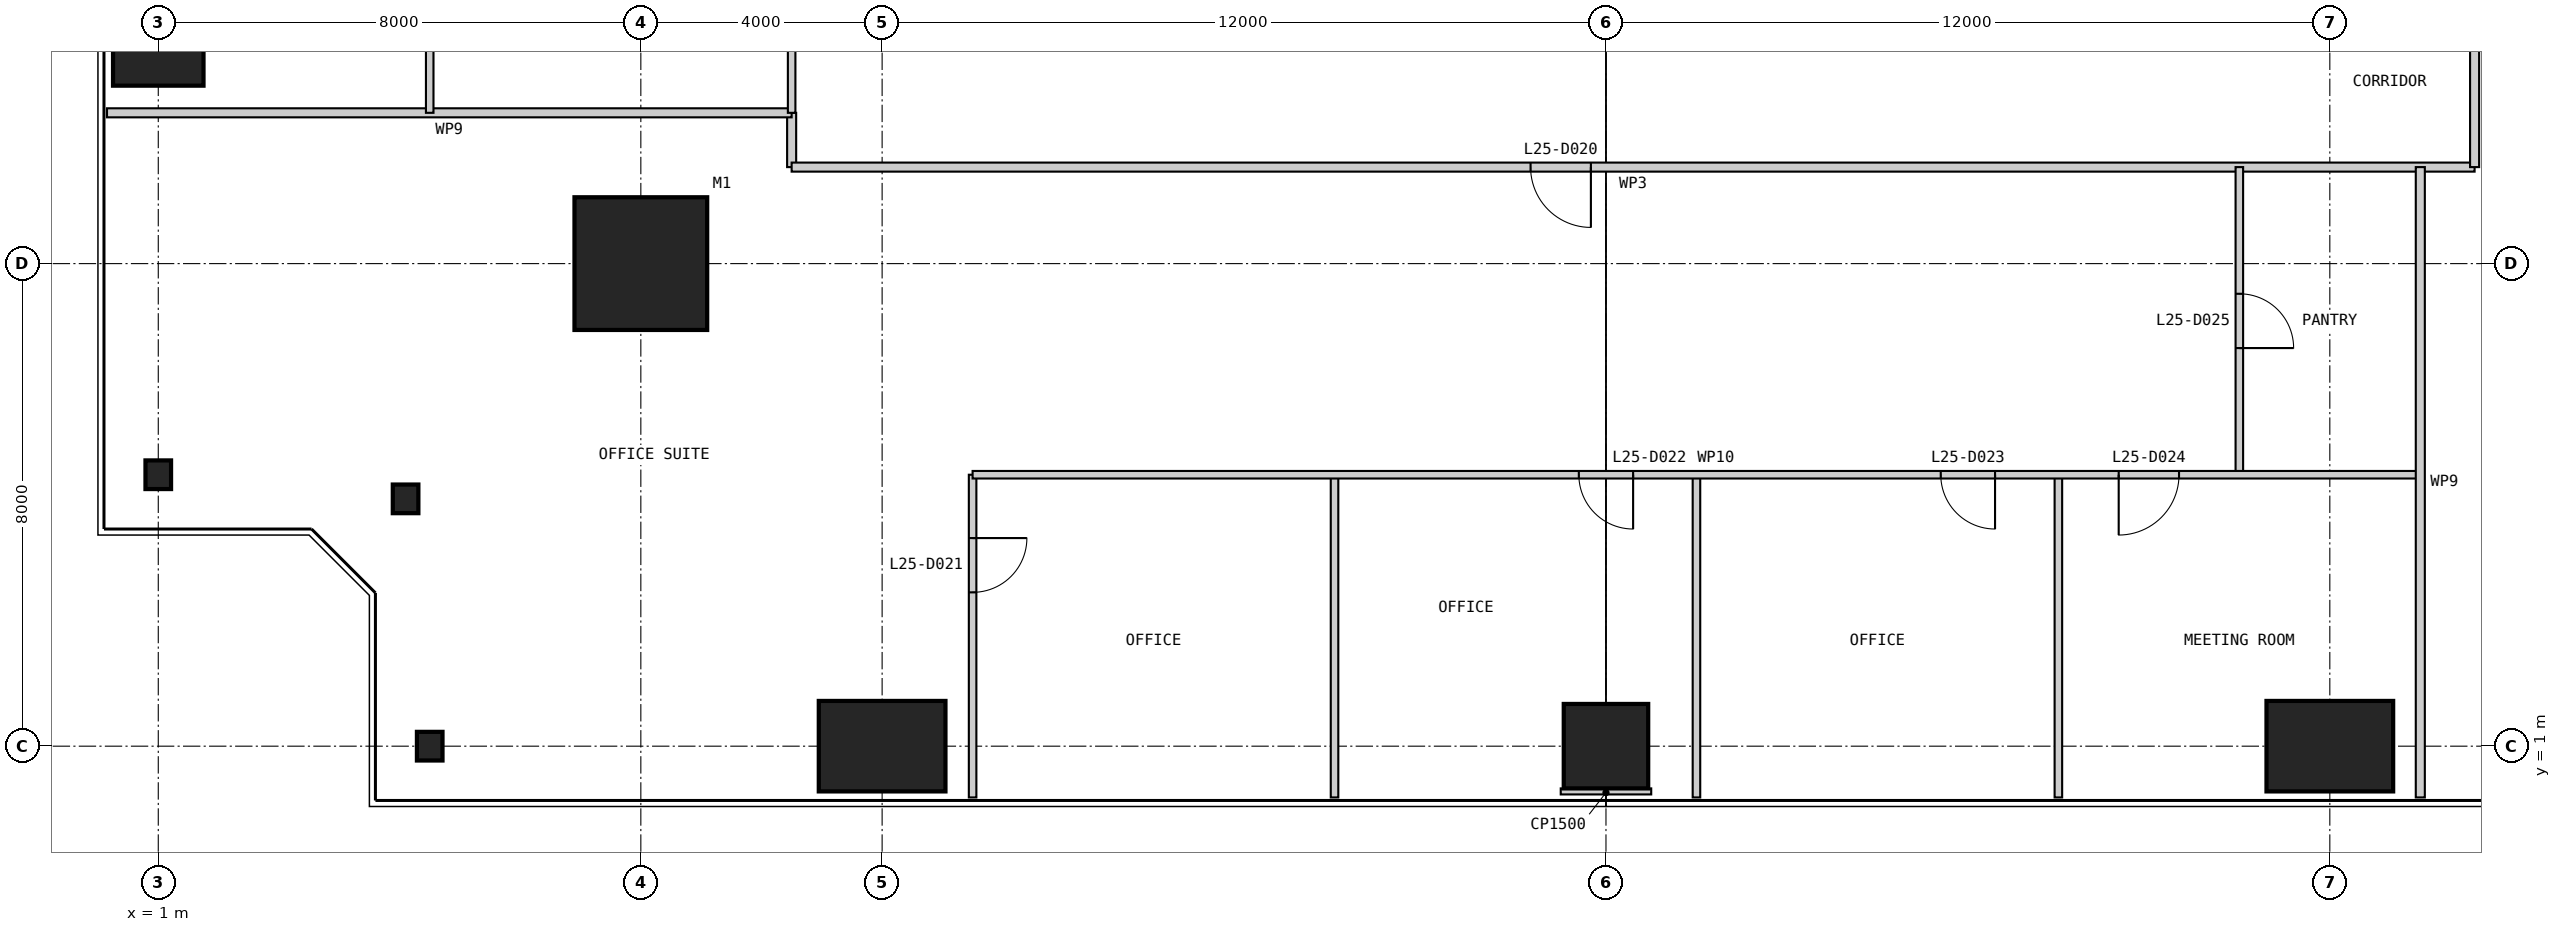
"""IFC4 building model, lengths in metres.
Left out: names, types, materials, properties, quantities, classifications, styles, units other than length and angle.
Written with IfcOpenShell. Run it as: python <this file> out.ifc"""

import sys

from ifc_helpers import new_model, si_unit, direction, frame, frame_2d, origin, origin_2d, place, context, subcontext, project, spatial, rectangle, i_section, extrude, element, fill, save


model = new_model("IFC4")
c1 = context("Model", 3, precision=1e-05, world=origin(), true_north=direction((0.0, 1.0)))
c2 = subcontext(c1, "Body", "Model", "MODEL_VIEW")
j1 = project(units=[si_unit("LENGTHUNIT", "METRE"), si_unit("PLANEANGLEUNIT", "RADIAN")], contexts=[c1])
p1 = place(None, origin())
s1 = spatial("IfcSite", under=j1, at=p1, CompositionType="ELEMENT")
p2 = place(p1, origin())
s2 = spatial("IfcBuilding", under=s1, at=p2, CompositionType="ELEMENT")
p3 = place(p2, frame((0.0, 0.0, 110.4)))
s3 = spatial("IfcBuildingStorey", under=s2, at=p3, CompositionType="ELEMENT", Elevation=110.4)
p4 = place(p3, frame((9.0, 9.0, 0.0), z_axis=(0.0, 0.0, 1.0), x_axis=(1.0, 0.0, 0.0)))
e1 = element("IfcColumn", 1, at=p4, inside=s3, PredefinedType="COLUMN", context=c2, shape_type="SweptSolid", body=[
    extrude(rectangle(XDim=2.2, YDim=2.2, at=origin_2d()), origin(), (0.0, 0.0, 1.0), 4.0),
])
p5 = place(p3, frame((5.5, 1.0, 0.0), z_axis=(0.0, 0.0, 1.0), x_axis=(1.0, 0.0, 0.0)))
e2 = element("IfcColumn", 2, at=p5, inside=s3, PredefinedType="COLUMN", context=c2, shape_type="SweptSolid", body=[
    extrude(i_section(OverallWidth=0.424, OverallDepth=0.475, WebThickness=0.048, FlangeThickness=0.077, at=origin_2d()), origin(), (0.0, 0.0, 1.0), 4.0),
])
p6 = place(p3, frame((13.0, 1.0, 0.0), z_axis=(0.0, 0.0, 1.0), x_axis=(1.0, 0.0, 0.0)))
e3 = element("IfcColumn", 3, at=p6, inside=s3, PredefinedType="COLUMN", context=c2, shape_type="SweptSolid", body=[
    extrude(rectangle(XDim=2.1, YDim=1.5, at=origin_2d()), origin(), (0.0, 0.0, 1.0), 4.0),
])
p7 = place(p3, frame((25.0, 1.0, 0.0), z_axis=(0.0, 0.0, 1.0), x_axis=(1.0, 0.0, 0.0)))
e4 = element("IfcColumn", 4, at=p7, inside=s3, PredefinedType="COLUMN", context=c2, shape_type="SweptSolid", body=[
    extrude(rectangle(XDim=1.4, YDim=1.4, at=origin_2d()), origin(), (0.0, 0.0, 1.0), 4.0),
])
p8 = place(p3, frame((37.0, 1.0, 0.0), z_axis=(0.0, 0.0, 1.0), x_axis=(1.0, 0.0, 0.0)))
e5 = element("IfcColumn", 5, at=p8, inside=s3, PredefinedType="COLUMN", context=c2, shape_type="SweptSolid", body=[
    extrude(rectangle(XDim=2.1, YDim=1.5, at=origin_2d()), origin(), (0.0, 0.0, 1.0), 4.0),
])
p9 = place(p3, frame((1.0, 13.0, 0.0), z_axis=(0.0, 0.0, 1.0), x_axis=(1.0, 0.0, 0.0)))
e6 = element("IfcColumn", 6, at=p9, inside=s3, PredefinedType="COLUMN", context=c2, shape_type="SweptSolid", body=[
    extrude(rectangle(XDim=1.5, YDim=2.1, at=origin_2d()), origin(), (0.0, 0.0, 1.0), 4.0),
])
for number, where, z_axis, x_axis in (
    (7, (1.0, 5.5, 0.0), (0.0, 0.0, 1.0), (1.0, 0.0, 0.0)),
    (8, (5.1, 5.1, 0.0), (0.0, 0.0, 1.0), (1.0, 0.0, 0.0)),
):
    element("IfcColumn", number, at=place(p3, frame(where, z_axis=z_axis, x_axis=x_axis)), inside=s3, PredefinedType="COLUMN", context=c2, shape_type="SweptSolid", body=[
        extrude(i_section(OverallWidth=0.424, OverallDepth=0.475, WebThickness=0.048, FlangeThickness=0.077, at=origin_2d()), origin(), (0.0, 0.0, 1.0), 4.0),
    ])
p10 = place(p3, frame((11.5, 11.5, 0.0), z_axis=(0.0, 0.0, 1.0), x_axis=(0.0, -1.0, 0.0)))
e9 = element("IfcWall", 9, at=p10, inside=s3, PredefinedType="PARTITIONING", context=c2, shape_type="SweptSolid", body=[
    extrude(rectangle(XDim=0.9, YDim=0.15, at=frame_2d((0.45, 0.0))), origin(), (0.0, 0.0, 1.0), 3.85),
])
p11 = place(p3, frame((11.5, 10.6, 0.0), z_axis=(0.0, 0.0, 1.0), x_axis=(1.0, 0.0, 0.0)))
e10 = element("IfcWall", 10, at=p11, inside=s3, PredefinedType="PARTITIONING", context=c2, shape_type="SweptSolid", body=[
    extrude(rectangle(XDim=27.9, YDim=0.15, at=frame_2d((13.95, 0.0))), origin(), (0.0, 0.0, 1.0), 3.85),
])
p12 = place(p11, frame((12.25, 0.0, 0.0)))
e11 = element("IfcOpeningElement", 11, at=p12, cuts=e10, PredefinedType="OPENING", context=c2, shape_type="SweptSolid", body=[
    extrude(rectangle(XDim=1.0, YDim=2.2, at=frame_2d((0.5, 1.1))), frame((0.0, 0.085, 0.0), z_axis=(0.0, -1.0, 0.0), x_axis=(1.0, 0.0, 0.0)), (0.0, 0.0, 1.0), 0.17),
])
p13 = place(p3, frame((0.15, 11.5, 0.0), z_axis=(0.0, 0.0, 1.0), x_axis=(1.0, 0.0, 0.0)))
e12 = element("IfcWall", 12, at=p13, inside=s3, PredefinedType="PARTITIONING", context=c2, shape_type="SweptSolid", body=[
    extrude(rectangle(XDim=11.35, YDim=0.15, at=frame_2d((5.675, 0.0))), origin(), (0.0, 0.0, 1.0), 3.85),
])
p14 = place(p3, frame((14.5, 0.15, 0.0), z_axis=(0.0, 0.0, 1.0), x_axis=(0.0, 1.0, 0.0)))
e13 = element("IfcWall", 13, at=p14, inside=s3, PredefinedType="PARTITIONING", context=c2, shape_type="SweptSolid", body=[
    extrude(rectangle(XDim=5.35, YDim=0.125, at=frame_2d((2.675, 0.0))), origin(), (0.0, 0.0, 1.0), 3.85),
])
p15 = place(p14, frame((3.4, 0.0, 0.0)))
e14 = element("IfcOpeningElement", 14, at=p15, cuts=e13, PredefinedType="OPENING", context=c2, shape_type="SweptSolid", body=[
    extrude(rectangle(XDim=0.9, YDim=2.2, at=frame_2d((0.45, 1.1))), frame((0.0, 0.073, 0.0), z_axis=(0.0, -1.0, 0.0), x_axis=(1.0, 0.0, 0.0)), (0.0, 0.0, 1.0), 0.145),
])
for number, where, z_axis, x_axis in (
    (15, (20.5, 0.15, 0.0), (0.0, 0.0, 1.0), (0.0, 1.0, 0.0)),
    (16, (26.5, 0.15, 0.0), (0.0, 0.0, 1.0), (0.0, 1.0, 0.0)),
    (17, (32.5, 0.15, 0.0), (0.0, 0.0, 1.0), (0.0, 1.0, 0.0)),
):
    element("IfcWall", number, at=place(p3, frame(where, z_axis=z_axis, x_axis=x_axis)), inside=s3, PredefinedType="PARTITIONING", context=c2, shape_type="SweptSolid", body=[
        extrude(rectangle(XDim=5.35, YDim=0.125, at=frame_2d((2.675, 0.0))), origin(), (0.0, 0.0, 1.0), 3.85),
    ])
p16 = place(p3, frame((35.5, 5.5, 0.0), z_axis=(0.0, 0.0, 1.0), x_axis=(0.0, 1.0, 0.0)))
e18 = element("IfcWall", 18, at=p16, inside=s3, PredefinedType="PARTITIONING", context=c2, shape_type="SweptSolid", body=[
    extrude(rectangle(XDim=5.1, YDim=0.125, at=frame_2d((2.55, 0.0))), origin(), (0.0, 0.0, 1.0), 3.85),
])
p17 = place(p16, frame((2.1, 0.0, 0.0)))
e19 = element("IfcOpeningElement", 19, at=p17, cuts=e18, PredefinedType="OPENING", context=c2, shape_type="SweptSolid", body=[
    extrude(rectangle(XDim=0.9, YDim=2.2, at=frame_2d((0.45, 1.1))), frame((0.0, 0.073, 0.0), z_axis=(0.0, -1.0, 0.0), x_axis=(1.0, 0.0, 0.0)), (0.0, 0.0, 1.0), 0.145),
])
p18 = place(p3, frame((14.5, 5.5, 0.0), z_axis=(0.0, 0.0, 1.0), x_axis=(1.0, 0.0, 0.0)))
e20 = element("IfcWall", 20, at=p18, inside=s3, PredefinedType="PARTITIONING", context=c2, shape_type="SweptSolid", body=[
    extrude(rectangle(XDim=24.0, YDim=0.125, at=frame_2d((12.0, 0.0))), origin(), (0.0, 0.0, 1.0), 3.85),
])
p19 = place(p18, frame((10.05, 0.0, 0.0)))
e21 = element("IfcOpeningElement", 21, at=p19, cuts=e20, PredefinedType="OPENING", context=c2, shape_type="SweptSolid", body=[
    extrude(rectangle(XDim=0.9, YDim=2.2, at=frame_2d((0.45, 1.1))), frame((0.0, 0.073, 0.0), z_axis=(0.0, -1.0, 0.0), x_axis=(1.0, 0.0, 0.0)), (0.0, 0.0, 1.0), 0.145),
])
p20 = place(p18, frame((16.05, 0.0, 0.0)))
e22 = element("IfcOpeningElement", 22, at=p20, cuts=e20, PredefinedType="OPENING", context=c2, shape_type="SweptSolid", body=[
    extrude(rectangle(XDim=0.9, YDim=2.2, at=frame_2d((0.45, 1.1))), frame((0.0, 0.073, 0.0), z_axis=(0.0, -1.0, 0.0), x_axis=(1.0, 0.0, 0.0)), (0.0, 0.0, 1.0), 0.145),
])
p21 = place(p18, frame((19.0, 0.0, 0.0)))
e23 = element("IfcOpeningElement", 23, at=p21, cuts=e20, PredefinedType="OPENING", context=c2, shape_type="SweptSolid", body=[
    extrude(rectangle(XDim=1.0, YDim=2.2, at=frame_2d((0.5, 1.1))), frame((0.0, 0.073, 0.0), z_axis=(0.0, -1.0, 0.0), x_axis=(1.0, 0.0, 0.0)), (0.0, 0.0, 1.0), 0.145),
])
p22 = place(p3, frame((39.4, 10.6, 0.0), z_axis=(0.0, 0.0, 1.0), x_axis=(0.0, 1.0, 0.0)))
e24 = element("IfcWall", 24, at=p22, inside=s3, PredefinedType="PARTITIONING", context=c2, shape_type="SweptSolid", body=[
    extrude(rectangle(XDim=28.8, YDim=0.15, at=frame_2d((14.4, 0.0))), origin(), (0.0, 0.0, 1.0), 3.85),
])
p23 = place(p22, frame((12.4, 0.0, 0.0)))
e25 = element("IfcOpeningElement", 25, at=p23, cuts=e24, PredefinedType="OPENING", context=c2, shape_type="SweptSolid", body=[
    extrude(rectangle(XDim=1.0, YDim=2.2, at=frame_2d((0.5, 1.1))), frame((0.0, 0.085, 0.0), z_axis=(0.0, -1.0, 0.0), x_axis=(1.0, 0.0, 0.0)), (0.0, 0.0, 1.0), 0.17),
])
p24 = place(p3, frame((38.5, 0.15, 0.0), z_axis=(0.0, 0.0, 1.0), x_axis=(0.0, 1.0, 0.0)))
e26 = element("IfcWall", 26, at=p24, inside=s3, PredefinedType="PARTITIONING", context=c2, shape_type="SweptSolid", body=[
    extrude(rectangle(XDim=10.45, YDim=0.15, at=frame_2d((5.225, 0.0))), origin(), (0.0, 0.0, 1.0), 3.85),
])
p25 = place(p3, frame((5.5, 17.5, 0.0), z_axis=(0.0, 0.0, 1.0), x_axis=(0.0, -1.0, 0.0)))
e27 = element("IfcWall", 27, at=p25, inside=s3, PredefinedType="PARTITIONING", context=c2, shape_type="SweptSolid", body=[
    extrude(rectangle(XDim=6.0, YDim=0.125, at=frame_2d((3.0, 0.0))), origin(), (0.0, 0.0, 1.0), 3.85),
])
p26 = place(p3, frame((11.5, 14.5, 0.0), z_axis=(0.0, 0.0, 1.0), x_axis=(0.0, -1.0, 0.0)))
e28 = element("IfcWall", 28, at=p26, inside=s3, PredefinedType="PARTITIONING", context=c2, shape_type="SweptSolid", body=[
    extrude(rectangle(XDim=3.0, YDim=0.125, at=frame_2d((1.5, 0.0))), origin(), (0.0, 0.0, 1.0), 3.85),
])
p27 = place(p3, frame((25.0, 0.2, 0.0), z_axis=(0.0, 0.0, 1.0), x_axis=(0.0, 1.0, 0.0)))
e29 = element("IfcWall", 29, at=p27, inside=s3, PredefinedType="PARTITIONING", context=c2, shape_type="SweptSolid", body=[
    extrude(rectangle(XDim=0.1, YDim=1.5, at=frame_2d((0.05, 0.0))), origin(), (0.0, 0.0, 1.0), 3.85),
])
p28 = place(p12, frame((1.0, 0.0, 0.0), z_axis=(0.0, 0.0, 1.0), x_axis=(-1.0, 0.0, 0.0)))
e30 = element("IfcDoor", 30, at=p28, inside=s3, OperationType="SINGLE_SWING_LEFT", PredefinedType="DOOR", context=c2, shape_type="SweptSolid", body=[
    extrude(rectangle(XDim=1.0, YDim=2.2, at=frame_2d((0.5, 1.1))), frame((0.0, 0.025, 0.0), z_axis=(0.0, -1.0, 0.0), x_axis=(1.0, 0.0, 0.0)), (0.0, 0.0, 1.0), 0.05),
])
fill(e11, e30)
p29 = place(p15, frame((0.9, 0.0, 0.0), z_axis=(0.0, 0.0, 1.0), x_axis=(-1.0, 0.0, 0.0)))
e31 = element("IfcDoor", 31, at=p29, inside=s3, OperationType="SINGLE_SWING_LEFT", PredefinedType="DOOR", context=c2, shape_type="SweptSolid", body=[
    extrude(rectangle(XDim=0.9, YDim=2.2, at=frame_2d((0.45, 1.1))), frame((0.0, 0.025, 0.0), z_axis=(0.0, -1.0, 0.0), x_axis=(1.0, 0.0, 0.0)), (0.0, 0.0, 1.0), 0.05),
])
fill(e14, e31)
p30 = place(p19, frame((0.9, 0.0, 0.0), z_axis=(0.0, 0.0, 1.0), x_axis=(-1.0, 0.0, 0.0)))
e32 = element("IfcDoor", 32, at=p30, inside=s3, OperationType="SINGLE_SWING_LEFT", PredefinedType="DOOR", context=c2, shape_type="SweptSolid", body=[
    extrude(rectangle(XDim=0.9, YDim=2.2, at=frame_2d((0.45, 1.1))), frame((0.0, 0.025, 0.0), z_axis=(0.0, -1.0, 0.0), x_axis=(1.0, 0.0, 0.0)), (0.0, 0.0, 1.0), 0.05),
])
fill(e21, e32)
p31 = place(p20, frame((0.9, 0.0, 0.0), z_axis=(0.0, 0.0, 1.0), x_axis=(-1.0, 0.0, 0.0)))
e33 = element("IfcDoor", 33, at=p31, inside=s3, OperationType="SINGLE_SWING_LEFT", PredefinedType="DOOR", context=c2, shape_type="SweptSolid", body=[
    extrude(rectangle(XDim=0.9, YDim=2.2, at=frame_2d((0.45, 1.1))), frame((0.0, 0.025, 0.0), z_axis=(0.0, -1.0, 0.0), x_axis=(1.0, 0.0, 0.0)), (0.0, 0.0, 1.0), 0.05),
])
fill(e22, e33)
p32 = place(p21, frame((1.0, 0.0, 0.0), z_axis=(0.0, 0.0, 1.0), x_axis=(-1.0, 0.0, 0.0)))
e34 = element("IfcDoor", 34, at=p32, inside=s3, OperationType="SINGLE_SWING_RIGHT", PredefinedType="DOOR", context=c2, shape_type="SweptSolid", body=[
    extrude(rectangle(XDim=1.0, YDim=2.2, at=frame_2d((0.5, 1.1))), frame((0.0, 0.025, 0.0), z_axis=(0.0, -1.0, 0.0), x_axis=(1.0, 0.0, 0.0)), (0.0, 0.0, 1.0), 0.05),
])
fill(e23, e34)
p33 = place(p17, frame((0.9, 0.0, 0.0), z_axis=(0.0, 0.0, 1.0), x_axis=(-1.0, 0.0, 0.0)))
e35 = element("IfcDoor", 35, at=p33, inside=s3, OperationType="SINGLE_SWING_RIGHT", PredefinedType="DOOR", context=c2, shape_type="SweptSolid", body=[
    extrude(rectangle(XDim=0.9, YDim=2.2, at=frame_2d((0.45, 1.1))), frame((0.0, 0.025, 0.0), z_axis=(0.0, -1.0, 0.0), x_axis=(1.0, 0.0, 0.0)), (0.0, 0.0, 1.0), 0.05),
])
fill(e19, e35)
save(model, sys.argv[1])
